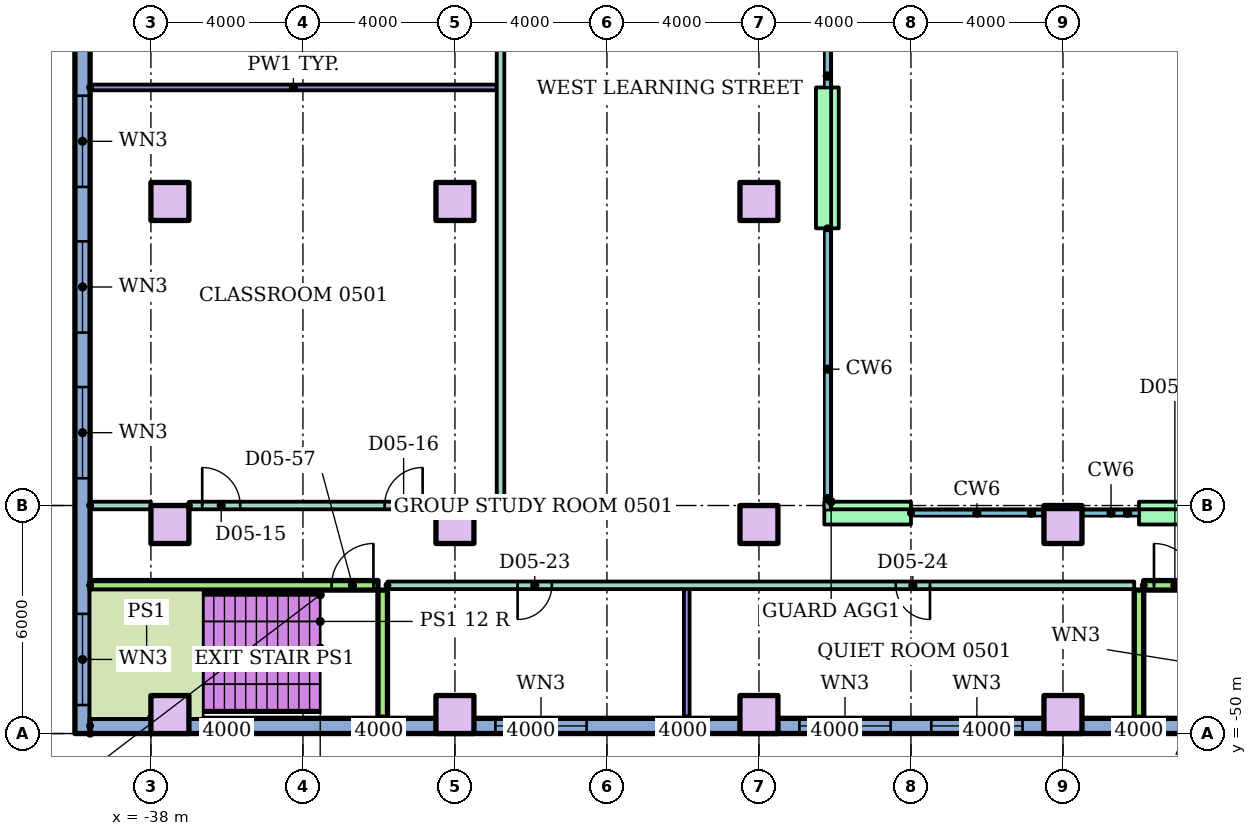
"""IFC4 building model, lengths in metres.
Left out: names, types, materials, properties, quantities, classifications, styles, units other than length and angle.
Written with IfcOpenShell. Run it as: python <this file> out.ifc"""

import sys

from ifc_helpers import new_model, si_unit, direction, frame, frame_2d, origin, origin_2d, place, context, subcontext, project, spatial, rectangle, extrude, element, fill, save


model = new_model("IFC4")
c1 = context("Model", 3, precision=1e-05, world=origin(), true_north=direction((0.0, 1.0)))
c2 = subcontext(c1, "Body", "Model", "MODEL_VIEW")
j1 = project(units=[si_unit("LENGTHUNIT", "METRE"), si_unit("PLANEANGLEUNIT", "RADIAN")], contexts=[c1])
p1 = place(None, origin())
s1 = spatial("IfcSite", under=j1, at=p1, CompositionType="ELEMENT")
p2 = place(p1, origin())
s2 = spatial("IfcBuilding", under=s1, at=p2, CompositionType="ELEMENT")
p3 = place(p2, frame((0.0, 0.0, 22.0)))
s3 = spatial("IfcBuildingStorey", under=s2, at=p3, CompositionType="ELEMENT", Elevation=22.0)
for number, where in (
    (1, (-37.5, -49.5, 0.0)),
    (2, (-30.0, -49.5, 0.0)),
    (3, (-22.0, -49.5, 0.0)),
    (4, (-14.0, -49.5, 0.0)),
    (5, (-37.5, -44.5, 0.0)),
    (6, (-30.0, -44.5, 0.0)),
    (7, (-22.0, -44.5, 0.0)),
    (8, (-14.0, -44.5, 0.0)),
    (9, (-37.5, -36.0, 0.0)),
    (10, (-30.0, -36.0, 0.0)),
    (11, (-22.0, -36.0, 0.0)),
):
    element("IfcColumn", number, at=place(p3, frame(where)), inside=s3, PredefinedType="COLUMN", context=c2, shape_type="SweptSolid", body=[
        extrude(rectangle(XDim=1.0, YDim=1.0, at=origin_2d()), origin(), (0.0, 0.0, 1.0), 3.7),
    ])
p4 = place(p3, frame((-39.8, 20.0, 0.0), z_axis=(0.0, 0.0, 1.0), x_axis=(0.0, -1.0, 0.0)))
e12 = element("IfcWall", 12, at=p4, inside=s3, PredefinedType="STANDARD", context=c2, shape_type="SweptSolid", body=[
    extrude(rectangle(XDim=70.0, YDim=0.4, at=frame_2d((35.0, 0.0))), origin(), (0.0, 0.0, 1.0), 3.7),
])
p5 = place(p4, frame((1.05, 0.0, 0.9)))
e13 = element("IfcOpeningElement", 13, at=p5, cuts=e12, PredefinedType="OPENING", context=c2, shape_type="SweptSolid", body=[
    extrude(rectangle(XDim=2.4, YDim=2.1, at=frame_2d((1.2, 1.05))), frame((0.0, 0.21, 0.0), z_axis=(0.0, -1.0, 0.0), x_axis=(1.0, 0.0, 0.0)), (0.0, 0.0, 1.0), 0.42),
])
p6 = place(p4, frame((5.55, 0.0, 0.9)))
e14 = element("IfcOpeningElement", 14, at=p6, cuts=e12, PredefinedType="OPENING", context=c2, shape_type="SweptSolid", body=[
    extrude(rectangle(XDim=2.4, YDim=2.1, at=frame_2d((1.2, 1.05))), frame((0.0, 0.21, 0.0), z_axis=(0.0, -1.0, 0.0), x_axis=(1.0, 0.0, 0.0)), (0.0, 0.0, 1.0), 0.42),
])
p7 = place(p4, frame((9.863, 0.0, 0.9)))
e15 = element("IfcOpeningElement", 15, at=p7, cuts=e12, PredefinedType="OPENING", context=c2, shape_type="SweptSolid", body=[
    extrude(rectangle(XDim=2.4, YDim=2.1, at=frame_2d((1.2, 1.05))), frame((0.0, 0.21, 0.0), z_axis=(0.0, -1.0, 0.0), x_axis=(1.0, 0.0, 0.0)), (0.0, 0.0, 1.0), 0.42),
])
p8 = place(p4, frame((13.988, 0.0, 0.9)))
e16 = element("IfcOpeningElement", 16, at=p8, cuts=e12, PredefinedType="OPENING", context=c2, shape_type="SweptSolid", body=[
    extrude(rectangle(XDim=2.4, YDim=2.1, at=frame_2d((1.2, 1.05))), frame((0.0, 0.21, 0.0), z_axis=(0.0, -1.0, 0.0), x_axis=(1.0, 0.0, 0.0)), (0.0, 0.0, 1.0), 0.42),
])
p9 = place(p4, frame((18.113, 0.0, 0.9)))
e17 = element("IfcOpeningElement", 17, at=p9, cuts=e12, PredefinedType="OPENING", context=c2, shape_type="SweptSolid", body=[
    extrude(rectangle(XDim=2.4, YDim=2.1, at=frame_2d((1.2, 1.05))), frame((0.0, 0.21, 0.0), z_axis=(0.0, -1.0, 0.0), x_axis=(1.0, 0.0, 0.0)), (0.0, 0.0, 1.0), 0.42),
])
p10 = place(p4, frame((22.238, 0.0, 0.9)))
e18 = element("IfcOpeningElement", 18, at=p10, cuts=e12, PredefinedType="OPENING", context=c2, shape_type="SweptSolid", body=[
    extrude(rectangle(XDim=2.4, YDim=2.1, at=frame_2d((1.2, 1.05))), frame((0.0, 0.21, 0.0), z_axis=(0.0, -1.0, 0.0), x_axis=(1.0, 0.0, 0.0)), (0.0, 0.0, 1.0), 0.42),
])
p11 = place(p4, frame((26.363, 0.0, 0.9)))
e19 = element("IfcOpeningElement", 19, at=p11, cuts=e12, PredefinedType="OPENING", context=c2, shape_type="SweptSolid", body=[
    extrude(rectangle(XDim=2.4, YDim=2.1, at=frame_2d((1.2, 1.05))), frame((0.0, 0.21, 0.0), z_axis=(0.0, -1.0, 0.0), x_axis=(1.0, 0.0, 0.0)), (0.0, 0.0, 1.0), 0.42),
])
p12 = place(p4, frame((30.488, 0.0, 0.9)))
e20 = element("IfcOpeningElement", 20, at=p12, cuts=e12, PredefinedType="OPENING", context=c2, shape_type="SweptSolid", body=[
    extrude(rectangle(XDim=2.4, YDim=2.1, at=frame_2d((1.2, 1.05))), frame((0.0, 0.21, 0.0), z_axis=(0.0, -1.0, 0.0), x_axis=(1.0, 0.0, 0.0)), (0.0, 0.0, 1.0), 0.42),
])
p13 = place(p4, frame((34.613, 0.0, 0.9)))
e21 = element("IfcOpeningElement", 21, at=p13, cuts=e12, PredefinedType="OPENING", context=c2, shape_type="SweptSolid", body=[
    extrude(rectangle(XDim=2.4, YDim=2.1, at=frame_2d((1.2, 1.05))), frame((0.0, 0.21, 0.0), z_axis=(0.0, -1.0, 0.0), x_axis=(1.0, 0.0, 0.0)), (0.0, 0.0, 1.0), 0.42),
])
p14 = place(p4, frame((38.738, 0.0, 0.9)))
e22 = element("IfcOpeningElement", 22, at=p14, cuts=e12, PredefinedType="OPENING", context=c2, shape_type="SweptSolid", body=[
    extrude(rectangle(XDim=2.4, YDim=2.1, at=frame_2d((1.2, 1.05))), frame((0.0, 0.21, 0.0), z_axis=(0.0, -1.0, 0.0), x_axis=(1.0, 0.0, 0.0)), (0.0, 0.0, 1.0), 0.42),
])
p15 = place(p4, frame((42.55, 0.0, 0.9)))
e23 = element("IfcOpeningElement", 23, at=p15, cuts=e12, PredefinedType="OPENING", context=c2, shape_type="SweptSolid", body=[
    extrude(rectangle(XDim=2.4, YDim=2.1, at=frame_2d((1.2, 1.05))), frame((0.0, 0.21, 0.0), z_axis=(0.0, -1.0, 0.0), x_axis=(1.0, 0.0, 0.0)), (0.0, 0.0, 1.0), 0.42),
])
p16 = place(p4, frame((46.05, 0.0, 0.9)))
e24 = element("IfcOpeningElement", 24, at=p16, cuts=e12, PredefinedType="OPENING", context=c2, shape_type="SweptSolid", body=[
    extrude(rectangle(XDim=2.4, YDim=2.1, at=frame_2d((1.2, 1.05))), frame((0.0, 0.21, 0.0), z_axis=(0.0, -1.0, 0.0), x_axis=(1.0, 0.0, 0.0)), (0.0, 0.0, 1.0), 0.42),
])
p17 = place(p4, frame((49.55, 0.0, 0.9)))
e25 = element("IfcOpeningElement", 25, at=p17, cuts=e12, PredefinedType="OPENING", context=c2, shape_type="SweptSolid", body=[
    extrude(rectangle(XDim=2.4, YDim=2.1, at=frame_2d((1.2, 1.05))), frame((0.0, 0.21, 0.0), z_axis=(0.0, -1.0, 0.0), x_axis=(1.0, 0.0, 0.0)), (0.0, 0.0, 1.0), 0.42),
])
p18 = place(p4, frame((53.217, 0.0, 0.9)))
e26 = element("IfcOpeningElement", 26, at=p18, cuts=e12, PredefinedType="OPENING", context=c2, shape_type="SweptSolid", body=[
    extrude(rectangle(XDim=2.4, YDim=2.1, at=frame_2d((1.2, 1.05))), frame((0.0, 0.21, 0.0), z_axis=(0.0, -1.0, 0.0), x_axis=(1.0, 0.0, 0.0)), (0.0, 0.0, 1.0), 0.42),
])
p19 = place(p4, frame((57.05, 0.0, 0.9)))
e27 = element("IfcOpeningElement", 27, at=p19, cuts=e12, PredefinedType="OPENING", context=c2, shape_type="SweptSolid", body=[
    extrude(rectangle(XDim=2.4, YDim=2.1, at=frame_2d((1.2, 1.05))), frame((0.0, 0.21, 0.0), z_axis=(0.0, -1.0, 0.0), x_axis=(1.0, 0.0, 0.0)), (0.0, 0.0, 1.0), 0.42),
])
p20 = place(p4, frame((60.883, 0.0, 0.9)))
e28 = element("IfcOpeningElement", 28, at=p20, cuts=e12, PredefinedType="OPENING", context=c2, shape_type="SweptSolid", body=[
    extrude(rectangle(XDim=2.4, YDim=2.1, at=frame_2d((1.2, 1.05))), frame((0.0, 0.21, 0.0), z_axis=(0.0, -1.0, 0.0), x_axis=(1.0, 0.0, 0.0)), (0.0, 0.0, 1.0), 0.42),
])
p21 = place(p4, frame((66.85, 0.0, 0.9)))
e29 = element("IfcOpeningElement", 29, at=p21, cuts=e12, PredefinedType="OPENING", context=c2, shape_type="SweptSolid", body=[
    extrude(rectangle(XDim=2.4, YDim=2.1, at=frame_2d((1.2, 1.05))), frame((0.0, 0.21, 0.0), z_axis=(0.0, -1.0, 0.0), x_axis=(1.0, 0.0, 0.0)), (0.0, 0.0, 1.0), 0.42),
])
p22 = place(p3, frame((-39.6, -49.8, 0.0)))
e30 = element("IfcWall", 30, at=p22, inside=s3, PredefinedType="STANDARD", context=c2, shape_type="SweptSolid", body=[
    extrude(rectangle(XDim=79.2, YDim=0.4, at=frame_2d((39.6, 0.0))), origin(), (0.0, 0.0, 1.0), 3.7),
])
p23 = place(p22, frame((10.665, 0.0, 0.9)))
e31 = element("IfcOpeningElement", 31, at=p23, cuts=e30, PredefinedType="OPENING", context=c2, shape_type="SweptSolid", body=[
    extrude(rectangle(XDim=2.4, YDim=2.1, at=frame_2d((1.2, 1.05))), frame((0.0, 0.21, 0.0), z_axis=(0.0, -1.0, 0.0), x_axis=(1.0, 0.0, 0.0)), (0.0, 0.0, 1.0), 0.42),
])
p24 = place(p22, frame((18.665, 0.0, 0.9)))
e32 = element("IfcOpeningElement", 32, at=p24, cuts=e30, PredefinedType="OPENING", context=c2, shape_type="SweptSolid", body=[
    extrude(rectangle(XDim=2.4, YDim=2.1, at=frame_2d((1.2, 1.05))), frame((0.0, 0.21, 0.0), z_axis=(0.0, -1.0, 0.0), x_axis=(1.0, 0.0, 0.0)), (0.0, 0.0, 1.0), 0.42),
])
p25 = place(p22, frame((22.135, 0.0, 0.9)))
e33 = element("IfcOpeningElement", 33, at=p25, cuts=e30, PredefinedType="OPENING", context=c2, shape_type="SweptSolid", body=[
    extrude(rectangle(XDim=2.4, YDim=2.1, at=frame_2d((1.2, 1.05))), frame((0.0, 0.21, 0.0), z_axis=(0.0, -1.0, 0.0), x_axis=(1.0, 0.0, 0.0)), (0.0, 0.0, 1.0), 0.42),
])
p26 = place(p22, frame((30.135, 0.0, 0.9)))
e34 = element("IfcOpeningElement", 34, at=p26, cuts=e30, PredefinedType="OPENING", context=c2, shape_type="SweptSolid", body=[
    extrude(rectangle(XDim=2.05, YDim=2.1, at=frame_2d((1.025, 1.05))), frame((0.0, 0.21, 0.0), z_axis=(0.0, -1.0, 0.0), x_axis=(1.0, 0.0, 0.0)), (0.0, 0.0, 1.0), 0.42),
])
p27 = place(p22, frame((38.135, 0.0, 0.9)))
e35 = element("IfcOpeningElement", 35, at=p27, cuts=e30, PredefinedType="OPENING", context=c2, shape_type="SweptSolid", body=[
    extrude(rectangle(XDim=2.4, YDim=2.1, at=frame_2d((1.2, 1.05))), frame((0.0, 0.21, 0.0), z_axis=(0.0, -1.0, 0.0), x_axis=(1.0, 0.0, 0.0)), (0.0, 0.0, 1.0), 0.42),
])
p28 = place(p22, frame((47.015, 0.0, 0.9)))
e36 = element("IfcOpeningElement", 36, at=p28, cuts=e30, PredefinedType="OPENING", context=c2, shape_type="SweptSolid", body=[
    extrude(rectangle(XDim=1.52, YDim=2.1, at=frame_2d((0.76, 1.05))), frame((0.0, 0.21, 0.0), z_axis=(0.0, -1.0, 0.0), x_axis=(1.0, 0.0, 0.0)), (0.0, 0.0, 1.0), 0.42),
])
p29 = place(p22, frame((54.135, 0.0, 0.9)))
e37 = element("IfcOpeningElement", 37, at=p29, cuts=e30, PredefinedType="OPENING", context=c2, shape_type="SweptSolid", body=[
    extrude(rectangle(XDim=2.4, YDim=2.1, at=frame_2d((1.2, 1.05))), frame((0.0, 0.21, 0.0), z_axis=(0.0, -1.0, 0.0), x_axis=(1.0, 0.0, 0.0)), (0.0, 0.0, 1.0), 0.42),
])
p30 = place(p3, frame((-10.0, -44.2, 0.0), z_axis=(0.0, 0.0, 1.0), x_axis=(-1.0, 0.0, 0.0)))
e38 = element("IfcWall", 38, at=p30, inside=s3, PredefinedType="STANDARD", context=c2, shape_type="SweptSolid", body=[
    extrude(rectangle(XDim=2.0, YDim=0.6, at=frame_2d((1.0, 0.0))), origin(), (0.0, 0.0, 1.0), 3.7),
])
p31 = place(p3, frame((-18.0, -44.2, 0.0), z_axis=(0.0, 0.0, 1.0), x_axis=(-1.0, 0.0, 0.0)))
e39 = element("IfcWall", 39, at=p31, inside=s3, PredefinedType="STANDARD", context=c2, shape_type="SweptSolid", body=[
    extrude(rectangle(XDim=2.28, YDim=0.6, at=frame_2d((1.14, 0.0))), origin(), (0.0, 0.0, 1.0), 3.7),
])
p32 = place(p3, frame((-20.2, -36.707, 0.0), z_axis=(0.0, 0.0, 1.0), x_axis=(0.0, 1.0, 0.0)))
e40 = element("IfcWall", 40, at=p32, inside=s3, PredefinedType="STANDARD", context=c2, shape_type="SweptSolid", body=[
    extrude(rectangle(XDim=3.707, YDim=0.6, at=frame_2d((1.854, 0.0))), origin(), (0.0, 0.0, 1.0), 3.7),
])
p33 = place(p3, frame((-31.775, -46.1, 0.0)))
e41 = element("IfcWall", 41, at=p33, inside=s3, PredefinedType="PARTITIONING", context=c2, shape_type="SweptSolid", body=[
    extrude(rectangle(XDim=19.65, YDim=0.2, at=frame_2d((9.825, 0.0))), origin(), (0.0, 0.0, 1.0), 3.2),
])
p34 = place(p33, frame((3.425, 0.0, 0.0)))
e42 = element("IfcOpeningElement", 42, at=p34, cuts=e41, PredefinedType="OPENING", context=c2, shape_type="SweptSolid", body=[
    extrude(rectangle(XDim=0.9, YDim=2.1, at=frame_2d((0.45, 1.05))), frame((0.0, 0.11, 0.0), z_axis=(0.0, -1.0, 0.0), x_axis=(1.0, 0.0, 0.0)), (0.0, 0.0, 1.0), 0.22),
])
p35 = place(p33, frame((13.375, 0.0, 0.0)))
e43 = element("IfcOpeningElement", 43, at=p35, cuts=e41, PredefinedType="OPENING", context=c2, shape_type="SweptSolid", body=[
    extrude(rectangle(XDim=0.9, YDim=2.1, at=frame_2d((0.45, 1.05))), frame((0.0, 0.11, 0.0), z_axis=(0.0, -1.0, 0.0), x_axis=(1.0, 0.0, 0.0)), (0.0, 0.0, 1.0), 0.22),
])
p36 = place(p3, frame((-39.6, -46.1, 0.0)))
e44 = element("IfcWall", 44, at=p36, inside=s3, PredefinedType="SOLIDWALL", context=c2, shape_type="SweptSolid", body=[
    extrude(rectangle(XDim=7.575, YDim=0.25, at=frame_2d((3.788, 0.0))), origin(), (0.0, 0.0, 1.0), 3.7),
])
p37 = place(p36, frame((6.355, 0.0, 0.0)))
e45 = element("IfcOpeningElement", 45, at=p37, cuts=e44, PredefinedType="OPENING", context=c2, shape_type="SweptSolid", body=[
    extrude(rectangle(XDim=1.1, YDim=2.1, at=frame_2d((0.55, 1.05))), frame((0.0, 0.135, 0.0), z_axis=(0.0, -1.0, 0.0), x_axis=(1.0, 0.0, 0.0)), (0.0, 0.0, 1.0), 0.27),
])
p38 = place(p3, frame((-11.875, -46.1, 0.0)))
e46 = element("IfcWall", 46, at=p38, inside=s3, PredefinedType="SOLIDWALL", context=c2, shape_type="SweptSolid", body=[
    extrude(rectangle(XDim=7.75, YDim=0.25, at=frame_2d((3.875, 0.0))), origin(), (0.0, 0.0, 1.0), 3.7),
])
p39 = place(p38, frame((0.27, 0.0, 0.0)))
e47 = element("IfcOpeningElement", 47, at=p39, cuts=e46, PredefinedType="OPENING", context=c2, shape_type="SweptSolid", body=[
    extrude(rectangle(XDim=1.1, YDim=2.1, at=frame_2d((0.55, 1.05))), frame((0.0, 0.135, 0.0), z_axis=(0.0, -1.0, 0.0), x_axis=(1.0, 0.0, 0.0)), (0.0, 0.0, 1.0), 0.27),
])
p40 = place(p3, frame((-39.6, -44.0, 0.0)))
e48 = element("IfcWall", 48, at=p40, inside=s3, PredefinedType="PARTITIONING", context=c2, shape_type="SweptSolid", body=[
    extrude(rectangle(XDim=1.6, YDim=0.2, at=frame_2d((0.8, 0.0))), origin(), (0.0, 0.0, 1.0), 3.2),
])
p41 = place(p3, frame((-37.0, -44.0, 0.0)))
e49 = element("IfcWall", 49, at=p41, inside=s3, PredefinedType="PARTITIONING", context=c2, shape_type="SweptSolid", body=[
    extrude(rectangle(XDim=6.5, YDim=0.2, at=frame_2d((3.25, 0.0))), origin(), (0.0, 0.0, 1.0), 3.2),
])
p42 = place(p41, frame((0.35, 0.0, 0.0)))
e50 = element("IfcOpeningElement", 50, at=p42, cuts=e49, PredefinedType="OPENING", context=c2, shape_type="SweptSolid", body=[
    extrude(rectangle(XDim=1.0, YDim=2.1, at=frame_2d((0.5, 1.05))), frame((0.0, 0.11, 0.0), z_axis=(0.0, -1.0, 0.0), x_axis=(1.0, 0.0, 0.0)), (0.0, 0.0, 1.0), 0.22),
])
p43 = place(p41, frame((5.15, 0.0, 0.0)))
e51 = element("IfcOpeningElement", 51, at=p43, cuts=e49, PredefinedType="OPENING", context=c2, shape_type="SweptSolid", body=[
    extrude(rectangle(XDim=1.0, YDim=2.1, at=frame_2d((0.5, 1.05))), frame((0.0, 0.11, 0.0), z_axis=(0.0, -1.0, 0.0), x_axis=(1.0, 0.0, 0.0)), (0.0, 0.0, 1.0), 0.22),
])
p44 = place(p3, frame((-29.5, -44.0, 0.0)))
e52 = element("IfcWall", 52, at=p44, inside=s3, PredefinedType="PARTITIONING", context=c2, shape_type="SweptSolid", body=[
    extrude(rectangle(XDim=0.6, YDim=0.2, at=frame_2d((0.3, 0.0))), origin(), (0.0, 0.0, 1.0), 3.2),
])
p45 = place(p3, frame((-39.6, -33.0, 0.0)))
e53 = element("IfcWall", 53, at=p45, inside=s3, PredefinedType="PARTITIONING", context=c2, shape_type="SweptSolid", body=[
    extrude(rectangle(XDim=10.7, YDim=0.15, at=frame_2d((5.35, 0.0))), origin(), (0.0, 0.0, 1.0), 3.2),
])
p46 = place(p3, frame((-31.9, -49.6, 0.0), z_axis=(0.0, 0.0, 1.0), x_axis=(0.0, 1.0, 0.0)))
e54 = element("IfcWall", 54, at=p46, inside=s3, PredefinedType="SOLIDWALL", context=c2, shape_type="SweptSolid", body=[
    extrude(rectangle(XDim=3.375, YDim=0.25, at=frame_2d((1.688, 0.0))), origin(), (0.0, 0.0, 1.0), 3.7),
])
p47 = place(p3, frame((-28.8, -44.0, 0.0), z_axis=(0.0, 0.0, 1.0), x_axis=(0.0, 1.0, 0.0)))
e55 = element("IfcWall", 55, at=p47, inside=s3, PredefinedType="PARTITIONING", context=c2, shape_type="SweptSolid", body=[
    extrude(rectangle(XDim=21.9, YDim=0.2, at=frame_2d((10.95, 0.0))), origin(), (0.0, 0.0, 1.0), 3.2),
])
p48 = place(p3, frame((-23.9, -49.6, 0.0), z_axis=(0.0, 0.0, 1.0), x_axis=(0.0, 1.0, 0.0)))
e56 = element("IfcWall", 56, at=p48, inside=s3, PredefinedType="PARTITIONING", context=c2, shape_type="SweptSolid", body=[
    extrude(rectangle(XDim=3.4, YDim=0.15, at=frame_2d((1.7, 0.0))), origin(), (0.0, 0.0, 1.0), 3.2),
])
p49 = place(p3, frame((-12.0, -49.6, 0.0), z_axis=(0.0, 0.0, 1.0), x_axis=(0.0, 1.0, 0.0)))
e57 = element("IfcWall", 57, at=p49, inside=s3, PredefinedType="SOLIDWALL", context=c2, shape_type="SweptSolid", body=[
    extrude(rectangle(XDim=3.375, YDim=0.25, at=frame_2d((1.688, 0.0))), origin(), (0.0, 0.0, 1.0), 3.7),
])
p50 = place(p18, origin())
e58 = element("IfcWindow", 58, at=p50, inside=s3, PartitioningType="SINGLE_PANEL", PredefinedType="WINDOW", context=c2, shape_type="SweptSolid", body=[
    extrude(rectangle(XDim=2.4, YDim=2.1, at=frame_2d((1.2, 1.05))), frame((0.0, 0.03, 0.0), z_axis=(0.0, -1.0, 0.0), x_axis=(1.0, 0.0, 0.0)), (0.0, 0.0, 1.0), 0.06),
])
fill(e26, e58)
p51 = place(p19, origin())
e59 = element("IfcWindow", 59, at=p51, inside=s3, PartitioningType="SINGLE_PANEL", PredefinedType="WINDOW", context=c2, shape_type="SweptSolid", body=[
    extrude(rectangle(XDim=2.4, YDim=2.1, at=frame_2d((1.2, 1.05))), frame((0.0, 0.03, 0.0), z_axis=(0.0, -1.0, 0.0), x_axis=(1.0, 0.0, 0.0)), (0.0, 0.0, 1.0), 0.06),
])
fill(e27, e59)
p52 = place(p20, origin())
e60 = element("IfcWindow", 60, at=p52, inside=s3, PartitioningType="SINGLE_PANEL", PredefinedType="WINDOW", context=c2, shape_type="SweptSolid", body=[
    extrude(rectangle(XDim=2.4, YDim=2.1, at=frame_2d((1.2, 1.05))), frame((0.0, 0.03, 0.0), z_axis=(0.0, -1.0, 0.0), x_axis=(1.0, 0.0, 0.0)), (0.0, 0.0, 1.0), 0.06),
])
fill(e28, e60)
p53 = place(p21, origin())
e61 = element("IfcWindow", 61, at=p53, inside=s3, PartitioningType="SINGLE_PANEL", PredefinedType="WINDOW", context=c2, shape_type="SweptSolid", body=[
    extrude(rectangle(XDim=2.4, YDim=2.1, at=frame_2d((1.2, 1.05))), frame((0.0, 0.03, 0.0), z_axis=(0.0, -1.0, 0.0), x_axis=(1.0, 0.0, 0.0)), (0.0, 0.0, 1.0), 0.06),
])
fill(e29, e61)
p54 = place(p23, origin())
e62 = element("IfcWindow", 62, at=p54, inside=s3, PartitioningType="SINGLE_PANEL", PredefinedType="WINDOW", context=c2, shape_type="SweptSolid", body=[
    extrude(rectangle(XDim=2.4, YDim=2.1, at=frame_2d((1.2, 1.05))), frame((0.0, 0.03, 0.0), z_axis=(0.0, -1.0, 0.0), x_axis=(1.0, 0.0, 0.0)), (0.0, 0.0, 1.0), 0.06),
])
fill(e31, e62)
p55 = place(p24, origin())
e63 = element("IfcWindow", 63, at=p55, inside=s3, PartitioningType="SINGLE_PANEL", PredefinedType="WINDOW", context=c2, shape_type="SweptSolid", body=[
    extrude(rectangle(XDim=2.4, YDim=2.1, at=frame_2d((1.2, 1.05))), frame((0.0, 0.03, 0.0), z_axis=(0.0, -1.0, 0.0), x_axis=(1.0, 0.0, 0.0)), (0.0, 0.0, 1.0), 0.06),
])
fill(e32, e63)
p56 = place(p25, origin())
e64 = element("IfcWindow", 64, at=p56, inside=s3, PartitioningType="SINGLE_PANEL", PredefinedType="WINDOW", context=c2, shape_type="SweptSolid", body=[
    extrude(rectangle(XDim=2.4, YDim=2.1, at=frame_2d((1.2, 1.05))), frame((0.0, 0.03, 0.0), z_axis=(0.0, -1.0, 0.0), x_axis=(1.0, 0.0, 0.0)), (0.0, 0.0, 1.0), 0.06),
])
fill(e33, e64)
p57 = place(p42, origin())
e65 = element("IfcDoor", 65, at=p57, inside=s3, OperationType="SINGLE_SWING_LEFT", PredefinedType="DOOR", context=c2, shape_type="SweptSolid", body=[
    extrude(rectangle(XDim=1.0, YDim=2.1, at=frame_2d((0.5, 1.05))), frame((0.0, 0.025, 0.0), z_axis=(0.0, -1.0, 0.0), x_axis=(1.0, 0.0, 0.0)), (0.0, 0.0, 1.0), 0.05),
])
fill(e50, e65)
p58 = place(p43, origin())
e66 = element("IfcDoor", 66, at=p58, inside=s3, OperationType="SINGLE_SWING_RIGHT", PredefinedType="DOOR", context=c2, shape_type="SweptSolid", body=[
    extrude(rectangle(XDim=1.0, YDim=2.1, at=frame_2d((0.5, 1.05))), frame((0.0, 0.025, 0.0), z_axis=(0.0, -1.0, 0.0), x_axis=(1.0, 0.0, 0.0)), (0.0, 0.0, 1.0), 0.05),
])
fill(e51, e66)
p59 = place(p34, frame((0.9, 0.0, 0.0), z_axis=(0.0, 0.0, 1.0), x_axis=(-1.0, 0.0, 0.0)))
e67 = element("IfcDoor", 67, at=p59, inside=s3, OperationType="SINGLE_SWING_LEFT", PredefinedType="DOOR", context=c2, shape_type="SweptSolid", body=[
    extrude(rectangle(XDim=0.9, YDim=2.1, at=frame_2d((0.45, 1.05))), frame((0.0, 0.025, 0.0), z_axis=(0.0, -1.0, 0.0), x_axis=(1.0, 0.0, 0.0)), (0.0, 0.0, 1.0), 0.05),
])
fill(e42, e67)
p60 = place(p35, frame((0.9, 0.0, 0.0), z_axis=(0.0, 0.0, 1.0), x_axis=(-1.0, 0.0, 0.0)))
e68 = element("IfcDoor", 68, at=p60, inside=s3, OperationType="SINGLE_SWING_RIGHT", PredefinedType="DOOR", context=c2, shape_type="SweptSolid", body=[
    extrude(rectangle(XDim=0.9, YDim=2.1, at=frame_2d((0.45, 1.05))), frame((0.0, 0.025, 0.0), z_axis=(0.0, -1.0, 0.0), x_axis=(1.0, 0.0, 0.0)), (0.0, 0.0, 1.0), 0.05),
])
fill(e43, e68)
p61 = place(p37, origin())
e69 = element("IfcDoor", 69, at=p61, inside=s3, OperationType="SINGLE_SWING_RIGHT", PredefinedType="DOOR", context=c2, shape_type="SweptSolid", body=[
    extrude(rectangle(XDim=1.1, YDim=2.1, at=frame_2d((0.55, 1.05))), frame((0.0, 0.025, 0.0), z_axis=(0.0, -1.0, 0.0), x_axis=(1.0, 0.0, 0.0)), (0.0, 0.0, 1.0), 0.05),
])
fill(e45, e69)
p62 = place(p39, origin())
e70 = element("IfcDoor", 70, at=p62, inside=s3, OperationType="SINGLE_SWING_LEFT", PredefinedType="DOOR", context=c2, shape_type="SweptSolid", body=[
    extrude(rectangle(XDim=1.1, YDim=2.1, at=frame_2d((0.55, 1.05))), frame((0.0, 0.025, 0.0), z_axis=(0.0, -1.0, 0.0), x_axis=(1.0, 0.0, 0.0)), (0.0, 0.0, 1.0), 0.05),
])
fill(e47, e70)
save(model, sys.argv[1])
